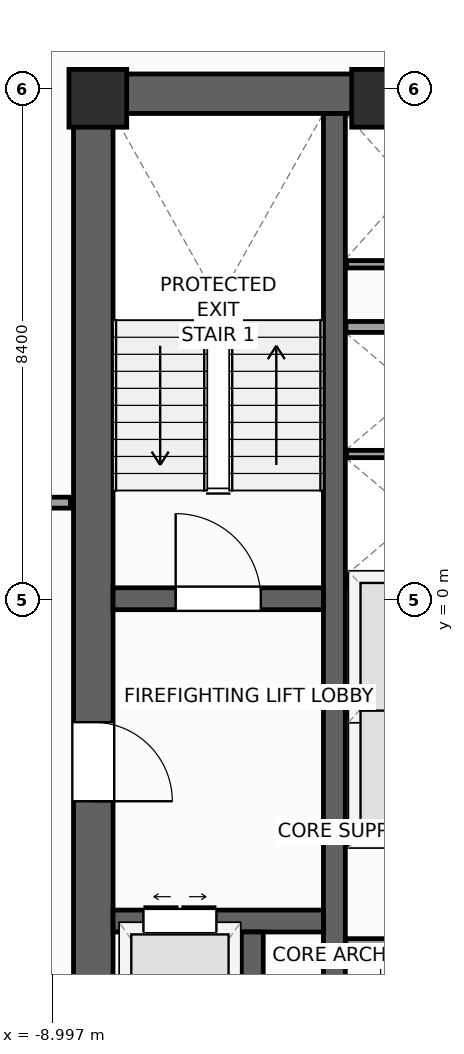
"""IFC4 building model, lengths in metres.
Left out: names, types, materials, properties, quantities, classifications, styles, units other than length and angle.
Written with IfcOpenShell. Run it as: python <this file> out.ifc"""

import sys

from ifc_helpers import new_model, si_unit, direction, frame, frame_2d, origin, origin_2d, place, context, subcontext, project, spatial, rectangle, extrude, source, transform, mapped, element, fill, save


model = new_model("IFC4")
c1 = context("Model", 3, precision=1e-05, world=origin(), true_north=direction((0.0, 1.0)))
c2 = subcontext(c1, "Body", "Model", "MODEL_VIEW")
j1 = project(units=[si_unit("LENGTHUNIT", "METRE"), si_unit("PLANEANGLEUNIT", "RADIAN")], contexts=[c1])
p1 = place(None, origin())
s1 = spatial("IfcSite", under=j1, at=p1, CompositionType="ELEMENT")
p2 = place(p1, origin())
s2 = spatial("IfcBuilding", under=s1, at=p2, CompositionType="ELEMENT")
p3 = place(p2, frame((0.0, 0.0, 192.4)))
s3 = spatial("IfcBuildingStorey", under=s2, at=p3, CompositionType="ELEMENT", Elevation=192.4)
p4 = place(p3, frame((-8.65, 8.325, 0.0), z_axis=(0.0, 0.0, 1.0), x_axis=(1.0, 0.0, 0.0)))
e1 = element("IfcWall", 1, at=p4, inside=s3, PredefinedType="SHEAR", context=c2, shape_type="SweptSolid", body=[
    extrude(rectangle(XDim=17.3, YDim=0.65, at=frame_2d((8.65, 0.0))), origin(), (0.0, 0.0, 1.0), 4.0),
])
p5 = place(p3, frame((-8.325, -8.0, 0.0), z_axis=(0.0, 0.0, 1.0), x_axis=(0.0, 1.0, 0.0)))
e2 = element("IfcWall", 2, at=p5, inside=s3, PredefinedType="SHEAR", context=c2, shape_type="SweptSolid", body=[
    extrude(rectangle(XDim=16.0, YDim=0.65, at=frame_2d((8.0, 0.0))), origin(), (0.0, 0.0, 1.0), 4.0),
])
p6 = place(p5, frame((4.69, 0.0, 0.0)))
e3 = element("IfcOpeningElement", 3, at=p6, cuts=e2, PredefinedType="OPENING", context=c2, shape_type="SweptSolid", body=[
    extrude(rectangle(XDim=1.3, YDim=2.2, at=frame_2d((0.65, 1.1))), frame((0.0, 0.335, 0.0), z_axis=(0.0, -1.0, 0.0), x_axis=(1.0, 0.0, 0.0)), (0.0, 0.0, 1.0), 0.67),
])
p7 = place(p3, frame((-4.36, -8.0, 0.0), z_axis=(0.0, 0.0, 1.0), x_axis=(0.0, 1.0, 0.0)))
e4 = element("IfcWall", 4, at=p7, inside=s3, PredefinedType="SHEAR", context=c2, shape_type="SweptSolid", body=[
    extrude(rectangle(XDim=16.0, YDim=0.36, at=frame_2d((8.0, 0.0))), origin(), (0.0, 0.0, 1.0), 4.0),
])
p8 = place(p3, frame((-8.0, 0.02, 0.0), z_axis=(0.0, 0.0, 1.0), x_axis=(1.0, 0.0, 0.0)))
e5 = element("IfcWall", 5, at=p8, inside=s3, PredefinedType="SHEAR", context=c2, shape_type="SweptSolid", body=[
    extrude(rectangle(XDim=3.46, YDim=0.36, at=frame_2d((1.73, 0.0))), origin(), (0.0, 0.0, 1.0), 4.0),
])
p9 = place(p8, frame((1.03, 0.0, 0.0)))
e6 = element("IfcOpeningElement", 6, at=p9, cuts=e5, PredefinedType="OPENING", context=c2, shape_type="SweptSolid", body=[
    extrude(rectangle(XDim=1.4, YDim=2.2, at=frame_2d((0.7, 1.1))), frame((0.0, 0.19, 0.0), z_axis=(0.0, -1.0, 0.0), x_axis=(1.0, 0.0, 0.0)), (0.0, 0.0, 1.0), 0.38),
])
p10 = place(p3, frame((-8.0, -5.28, 0.0), z_axis=(0.0, 0.0, 1.0), x_axis=(1.0, 0.0, 0.0)))
e7 = element("IfcWall", 7, at=p10, inside=s3, PredefinedType="SHEAR", context=c2, shape_type="SweptSolid", body=[
    extrude(rectangle(XDim=3.46, YDim=0.36, at=frame_2d((1.73, 0.0))), origin(), (0.0, 0.0, 1.0), 4.0),
])
p11 = place(p10, frame((0.5, 0.0, 0.0)))
e8 = element("IfcOpeningElement", 8, at=p11, cuts=e7, PredefinedType="OPENING", context=c2, shape_type="SweptSolid", body=[
    extrude(rectangle(XDim=1.2, YDim=2.25, at=frame_2d((0.6, 1.125))), frame((0.0, 0.19, 0.0), z_axis=(0.0, -1.0, 0.0), x_axis=(1.0, 0.0, 0.0)), (0.0, 0.0, 1.0), 0.38),
])
p12 = place(p3, frame((-5.71, -8.0, 0.0), z_axis=(0.0, 0.0, 1.0), x_axis=(0.0, 1.0, 0.0)))
e9 = element("IfcWall", 9, at=p12, inside=s3, PredefinedType="SHEAR", context=c2, shape_type="SweptSolid", body=[
    extrude(rectangle(XDim=2.54, YDim=0.36, at=frame_2d((1.27, 0.0))), origin(), (0.0, 0.0, 1.0), 4.0),
])
m1 = source(origin(), c2, "Body", "SweptSolid", [
    extrude(rectangle(XDim=0.95, YDim=0.95, at=origin_2d()), origin(), (0.0, 0.0, 1.0), 4.0),
])
for number, where, z_axis, x_axis in (
    (10, (-8.25, 8.25, 0.0), (0.0, 0.0, 1.0), (1.0, 0.0, 0.0)),
    (11, (-3.6, 8.25, 0.0), (0.0, 0.0, 1.0), (1.0, 0.0, 0.0)),
):
    element("IfcColumn", number, at=place(p3, frame(where, z_axis=z_axis, x_axis=x_axis)), inside=s3, PredefinedType="PILASTER", context=c2, shape_type="MappedRepresentation", body=[
        mapped(m1, transform((0.0, 0.0, 0.0), scale=1.0)),
    ])
for number, where, z_axis, x_axis in (
    (12, (-4.17, -3.9, 0.0), (0.0, 0.0, 1.0), (1.0, 0.0, 0.0)),
    (13, (-4.17, 0.3, 0.0), (0.0, 0.0, 1.0), (1.0, 0.0, 0.0)),
    (14, (-4.17, 4.49, 0.0), (0.0, 0.0, 1.0), (1.0, 0.0, 0.0)),
):
    element("IfcWall", number, at=place(p3, frame(where, z_axis=z_axis, x_axis=x_axis)), inside=s3, PredefinedType="PARTITIONING", context=c2, shape_type="SweptSolid", body=[
        extrude(rectangle(XDim=2.28, YDim=0.18, at=frame_2d((1.14, 0.0))), origin(), (0.0, 0.0, 1.0), 3.74),
    ])
for number, where, z_axis, x_axis in (
    (15, (-4.16, -1.8, 0.0), (0.0, 0.0, 1.0), (1.0, 0.0, 0.0)),
    (16, (-4.16, 2.4, 0.0), (0.0, 0.0, 1.0), (1.0, 0.0, 0.0)),
):
    element("IfcWall", number, at=place(p3, frame(where, z_axis=z_axis, x_axis=x_axis)), inside=s3, PredefinedType="PARTITIONING", context=c2, shape_type="SweptSolid", body=[
        extrude(rectangle(XDim=2.26, YDim=0.12, at=frame_2d((1.13, 0.0))), origin(), (0.0, 0.0, 1.0), 3.74),
    ])
p13 = place(p3, frame((-4.17, -5.65, 0.0), z_axis=(0.0, 0.0, 1.0), x_axis=(1.0, 0.0, 0.0)))
e17 = element("IfcWall", 17, at=p13, inside=s3, PredefinedType="PARTITIONING", context=c2, shape_type="SweptSolid", body=[
    extrude(rectangle(XDim=2.28, YDim=0.16, at=frame_2d((1.14, 0.0))), origin(), (0.0, 0.0, 1.0), 3.74),
])
p14 = place(p3, frame((-4.16, 5.52, 0.0), z_axis=(0.0, 0.0, 1.0), x_axis=(1.0, 0.0, 0.0)))
e18 = element("IfcWall", 18, at=p14, inside=s3, PredefinedType="PARTITIONING", context=c2, shape_type="SweptSolid", body=[
    extrude(rectangle(XDim=2.1, YDim=0.12, at=frame_2d((1.05, 0.0))), origin(), (0.0, 0.0, 1.0), 3.74),
])
p15 = place(p3, frame((-12.6, 1.6, 0.0), z_axis=(0.0, 0.0, 1.0), x_axis=(1.0, 0.0, 0.0)))
e19 = element("IfcWall", 19, at=p15, inside=s3, PredefinedType="PARTITIONING", context=c2, shape_type="SweptSolid", body=[
    extrude(rectangle(XDim=3.9, YDim=0.18, at=frame_2d((1.95, 0.0))), origin(), (0.0, 0.0, 1.0), 3.74),
])
p16 = place(p15, frame((1.4, 0.0, 0.0)))
e20 = element("IfcOpeningElement", 20, at=p16, cuts=e19, PredefinedType="OPENING", context=c2, shape_type="SweptSolid", body=[
    extrude(rectangle(XDim=1.1, YDim=2.2, at=frame_2d((0.55, 1.1))), frame((0.0, 0.1, 0.0), z_axis=(0.0, -1.0, 0.0), x_axis=(1.0, 0.0, 0.0)), (0.0, 0.0, 1.0), 0.2),
])
m2 = source(origin(), c2, "Body", "SweptSolid", [
    extrude(rectangle(XDim=1.4, YDim=2.2, at=frame_2d((0.7, 1.1))), frame((0.0, 0.025, 0.0), z_axis=(0.0, -1.0, 0.0), x_axis=(1.0, 0.0, 0.0)), (0.0, 0.0, 1.0), 0.05),
])
p17 = place(p9, origin())
e21 = element("IfcDoor", 21, at=p17, inside=s3, OperationType="SINGLE_SWING_LEFT", PredefinedType="DOOR", context=c2, shape_type="MappedRepresentation", body=[
    mapped(m2, transform((0.0, 0.0, 0.0), scale=1.0)),
])
fill(e6, e21)
m3 = source(origin(), c2, "Body", "SweptSolid", [
    extrude(rectangle(XDim=1.3, YDim=2.2, at=frame_2d((0.65, 1.1))), frame((0.0, 0.025, 0.0), z_axis=(0.0, -1.0, 0.0), x_axis=(1.0, 0.0, 0.0)), (0.0, 0.0, 1.0), 0.05),
])
p18 = place(p6, frame((1.3, 0.0, 0.0), z_axis=(0.0, 0.0, 1.0), x_axis=(-1.0, 0.0, 0.0)))
e22 = element("IfcDoor", 22, at=p18, inside=s3, OperationType="SINGLE_SWING_LEFT", PredefinedType="DOOR", context=c2, shape_type="MappedRepresentation", body=[
    mapped(m3, transform((0.0, 0.0, 0.0), scale=1.0)),
])
fill(e3, e22)
m4 = source(origin(), c2, "Body", "SweptSolid", [
    extrude(rectangle(XDim=1.2, YDim=2.25, at=frame_2d((0.6, 1.125))), frame((0.0, 0.025, 0.0), z_axis=(0.0, -1.0, 0.0), x_axis=(1.0, 0.0, 0.0)), (0.0, 0.0, 1.0), 0.05),
])
p19 = place(p11, origin())
e23 = element("IfcDoor", 23, at=p19, inside=s3, OperationType="DOUBLE_DOOR_SLIDING", PredefinedType="DOOR", context=c2, shape_type="MappedRepresentation", body=[
    mapped(m4, transform((0.0, 0.0, 0.0), scale=1.0)),
])
fill(e8, e23)
save(model, sys.argv[1])
